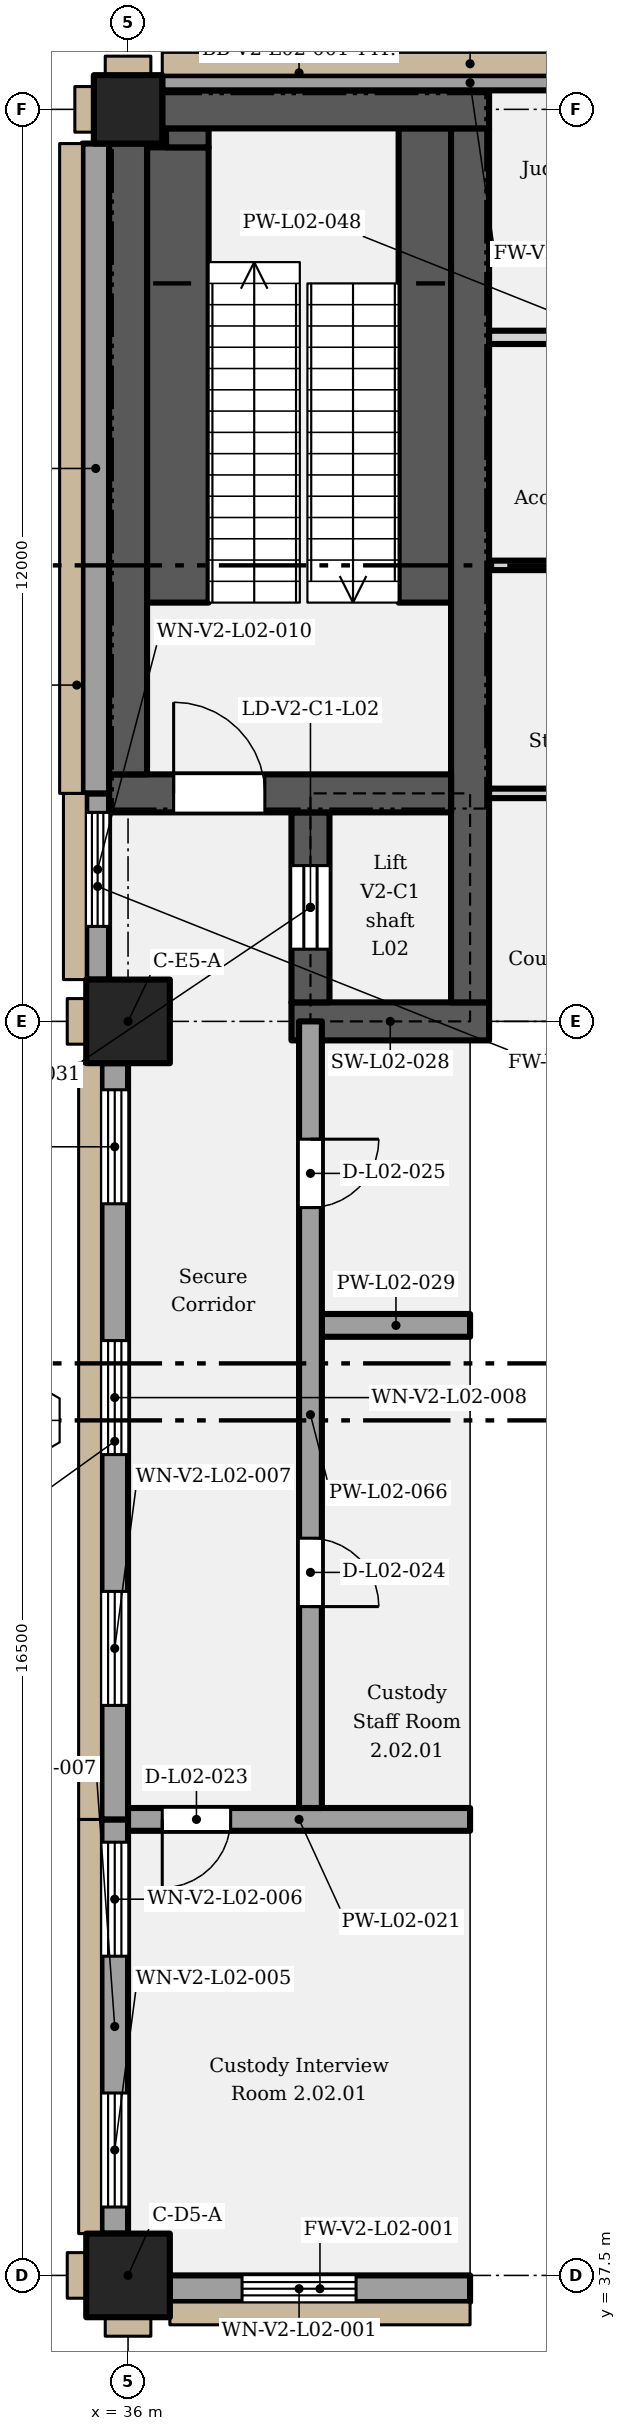
"""IFC4 building model, lengths in metres.
Left out: names, types, materials, properties, quantities, classifications, styles, units other than length and angle.
Written with IfcOpenShell. Run it as: python <this file> out.ifc"""

import sys

from ifc_helpers import new_model, si_unit, direction, frame, frame_2d, origin, origin_2d, place, context, subcontext, project, spatial, rectangle, extrude, element, fill, save


model = new_model("IFC4")
c1 = context("Model", 3, precision=1e-05, world=origin(), true_north=direction((0.0, 1.0)))
c2 = subcontext(c1, "Body", "Model", "MODEL_VIEW")
j1 = project(units=[si_unit("LENGTHUNIT", "METRE"), si_unit("PLANEANGLEUNIT", "RADIAN")], contexts=[c1])
p1 = place(None, origin())
s1 = spatial("IfcSite", under=j1, at=p1, CompositionType="ELEMENT")
p2 = place(p1, origin())
s2 = spatial("IfcBuilding", under=s1, at=p2, CompositionType="ELEMENT")
p3 = place(p2, frame((0.0, 0.0, 12.0)))
s3 = spatial("IfcBuildingStorey", under=s2, at=p3, CompositionType="ELEMENT", Elevation=12.0)
for number, where, z_axis, x_axis in (
    (1, (36.0, 37.5, 0.0), (0.0, 0.0, 1.0), (1.0, 0.0, 0.0)),
    (2, (36.0, 54.0, 0.0), (0.0, 0.0, 1.0), (1.0, 0.0, 0.0)),
):
    element("IfcColumn", number, at=place(p3, frame(where, z_axis=z_axis, x_axis=x_axis)), inside=s3, PredefinedType="COLUMN", context=c2, shape_type="SweptSolid", body=[
        extrude(rectangle(XDim=1.1, YDim=1.1, at=origin_2d()), origin(), (0.0, 0.0, 1.0), 5.4),
    ])
p4 = place(p3, frame((36.0, 66.0, 0.0), z_axis=(0.0, 0.0, 1.0), x_axis=(1.0, 0.0, 0.0)))
e3 = element("IfcColumn", 3, at=p4, inside=s3, PredefinedType="COLUMN", context=c2, shape_type="SweptSolid", body=[
    extrude(rectangle(XDim=0.9, YDim=0.9, at=origin_2d()), origin(), (0.0, 0.0, 1.0), 5.4),
])
p5 = place(p3, frame((38.15, 54.0, 0.0), z_axis=(0.0, 0.0, 1.0), x_axis=(1.0, 0.0, 0.0)))
e4 = element("IfcWall", 4, at=p5, inside=s3, PredefinedType="SHEAR", context=c2, shape_type="SweptSolid", body=[
    extrude(rectangle(XDim=2.6, YDim=0.5, at=frame_2d((1.3, 0.0))), origin(), (0.0, 0.0, 1.0), 5.15),
])
p6 = place(p3, frame((38.4, 54.25, 0.0), z_axis=(0.0, 0.0, 1.0), x_axis=(0.0, 1.0, 0.0)))
e5 = element("IfcWall", 5, at=p6, inside=s3, PredefinedType="SHEAR", context=c2, shape_type="SweptSolid", body=[
    extrude(rectangle(XDim=2.5, YDim=0.5, at=frame_2d((1.25, 0.0))), origin(), (0.0, 0.0, 1.0), 5.15),
])
p7 = place(p6, frame((0.7, 0.0, 0.0)))
e6 = element("IfcOpeningElement", 6, at=p7, cuts=e5, PredefinedType="OPENING", context=c2, shape_type="SweptSolid", body=[
    extrude(rectangle(XDim=1.1, YDim=2.1, at=frame_2d((0.55, 1.05))), frame((0.0, 0.26, 0.0), z_axis=(0.0, -1.0, 0.0), x_axis=(1.0, 0.0, 0.0)), (0.0, 0.0, 1.0), 0.52),
])
p8 = place(p3, frame((40.5, 54.25, 0.0), z_axis=(0.0, 0.0, 1.0), x_axis=(0.0, 1.0, 0.0)))
e7 = element("IfcWall", 7, at=p8, inside=s3, PredefinedType="SHEAR", context=c2, shape_type="SweptSolid", body=[
    extrude(rectangle(XDim=11.5, YDim=0.5, at=frame_2d((5.75, 0.0))), origin(), (0.0, 0.0, 1.0), 5.15),
])
p9 = place(p3, frame((35.75, 57.0, 0.0), z_axis=(0.0, 0.0, 1.0), x_axis=(1.0, 0.0, 0.0)))
e8 = element("IfcWall", 8, at=p9, inside=s3, PredefinedType="SHEAR", context=c2, shape_type="SweptSolid", body=[
    extrude(rectangle(XDim=4.5, YDim=0.5, at=frame_2d((2.25, 0.0))), origin(), (0.0, 0.0, 1.0), 5.15),
])
p10 = place(p9, frame((0.85, 0.0, 0.0)))
e9 = element("IfcOpeningElement", 9, at=p10, cuts=e8, PredefinedType="OPENING", context=c2, shape_type="SweptSolid", body=[
    extrude(rectangle(XDim=1.2, YDim=2.1, at=frame_2d((0.6, 1.05))), frame((0.0, 0.26, 0.0), z_axis=(0.0, -1.0, 0.0), x_axis=(1.0, 0.0, 0.0)), (0.0, 0.0, 1.0), 0.52),
])
p11 = place(p3, frame((36.0, 57.25, 0.0), z_axis=(0.0, 0.0, 1.0), x_axis=(0.0, 1.0, 0.0)))
e10 = element("IfcWall", 10, at=p11, inside=s3, PredefinedType="SHEAR", context=c2, shape_type="SweptSolid", body=[
    extrude(rectangle(XDim=8.3, YDim=0.5, at=frame_2d((4.15, 0.0))), origin(), (0.0, 0.0, 1.0), 5.15),
])
p12 = place(p3, frame((36.45, 66.0, 0.0), z_axis=(0.0, 0.0, 1.0), x_axis=(1.0, 0.0, 0.0)))
e11 = element("IfcWall", 11, at=p12, inside=s3, PredefinedType="SHEAR", context=c2, shape_type="SweptSolid", body=[
    extrude(rectangle(XDim=4.3, YDim=0.5, at=frame_2d((2.15, 0.0))), origin(), (0.0, 0.0, 1.0), 5.15),
])
p13 = place(p3, frame((36.55, 37.325, 0.0), z_axis=(0.0, 0.0, 1.0), x_axis=(1.0, 0.0, 0.0)))
e12 = element("IfcWall", 12, at=p13, inside=s3, PredefinedType="SOLIDWALL", context=c2, shape_type="SweptSolid", body=[
    extrude(rectangle(XDim=3.95, YDim=0.35, at=frame_2d((1.975, 0.0))), origin(), (0.0, 0.0, 1.0), 5.15),
])
p14 = place(p13, frame((0.95, 0.0, 1.05)))
e13 = element("IfcOpeningElement", 13, at=p14, cuts=e12, PredefinedType="OPENING", context=c2, shape_type="SweptSolid", body=[
    extrude(rectangle(XDim=1.5, YDim=3.5, at=frame_2d((0.75, 1.75))), frame((0.0, 0.185, 0.0), z_axis=(0.0, -1.0, 0.0), x_axis=(1.0, 0.0, 0.0)), (0.0, 0.0, 1.0), 0.37),
])
p15 = place(p3, frame((36.45, 66.35, 0.0), z_axis=(0.0, 0.0, 1.0), x_axis=(1.0, 0.0, 0.0)))
e14 = element("IfcWall", 14, at=p15, inside=s3, PredefinedType="SOLIDWALL", context=c2, shape_type="SweptSolid", body=[
    extrude(rectangle(XDim=8.1, YDim=0.2, at=frame_2d((4.05, 0.0))), origin(), (0.0, 0.0, 1.0), 5.15),
])
p16 = place(p15, frame((6.525, 0.0, 1.05)))
e15 = element("IfcOpeningElement", 15, at=p16, cuts=e14, PredefinedType="OPENING", context=c2, shape_type="SweptSolid", body=[
    extrude(rectangle(XDim=1.05, YDim=2.4, at=frame_2d((0.525, 1.2))), frame((0.0, 0.11, 0.0), z_axis=(0.0, -1.0, 0.0), x_axis=(1.0, 0.0, 0.0)), (0.0, 0.0, 1.0), 0.22),
])
p17 = place(p3, frame((35.825, 38.05, 0.0), z_axis=(0.0, 0.0, 1.0), x_axis=(0.0, 1.0, 0.0)))
e16 = element("IfcWall", 16, at=p17, inside=s3, PredefinedType="SOLIDWALL", context=c2, shape_type="SweptSolid", body=[
    extrude(rectangle(XDim=5.45, YDim=0.35, at=frame_2d((2.725, 0.0))), origin(), (0.0, 0.0, 1.0), 5.15),
])
p18 = place(p17, frame((0.35, 0.0, 1.05)))
e17 = element("IfcOpeningElement", 17, at=p18, cuts=e16, PredefinedType="OPENING", context=c2, shape_type="SweptSolid", body=[
    extrude(rectangle(XDim=1.5, YDim=3.5, at=frame_2d((0.75, 1.75))), frame((0.0, 0.185, 0.0), z_axis=(0.0, -1.0, 0.0), x_axis=(1.0, 0.0, 0.0)), (0.0, 0.0, 1.0), 0.37),
])
p19 = place(p17, frame((3.65, 0.0, 1.05)))
e18 = element("IfcOpeningElement", 18, at=p19, cuts=e16, PredefinedType="OPENING", context=c2, shape_type="SweptSolid", body=[
    extrude(rectangle(XDim=1.5, YDim=3.5, at=frame_2d((0.75, 1.75))), frame((0.0, 0.185, 0.0), z_axis=(0.0, -1.0, 0.0), x_axis=(1.0, 0.0, 0.0)), (0.0, 0.0, 1.0), 0.37),
])
p20 = place(p3, frame((35.825, 43.5, 0.0), z_axis=(0.0, 0.0, 1.0), x_axis=(0.0, 1.0, 0.0)))
e19 = element("IfcWall", 19, at=p20, inside=s3, PredefinedType="SOLIDWALL", context=c2, shape_type="SweptSolid", body=[
    extrude(rectangle(XDim=9.95, YDim=0.35, at=frame_2d((4.975, 0.0))), origin(), (0.0, 0.0, 1.0), 5.15),
])
p21 = place(p20, frame((1.5, 0.0, 1.05)))
e20 = element("IfcOpeningElement", 20, at=p21, cuts=e19, PredefinedType="OPENING", context=c2, shape_type="SweptSolid", body=[
    extrude(rectangle(XDim=1.5, YDim=3.5, at=frame_2d((0.75, 1.75))), frame((0.0, 0.185, 0.0), z_axis=(0.0, -1.0, 0.0), x_axis=(1.0, 0.0, 0.0)), (0.0, 0.0, 1.0), 0.37),
])
p22 = place(p20, frame((4.8, 0.0, 1.05)))
e21 = element("IfcOpeningElement", 21, at=p22, cuts=e19, PredefinedType="OPENING", context=c2, shape_type="SweptSolid", body=[
    extrude(rectangle(XDim=1.5, YDim=3.5, at=frame_2d((0.75, 1.75))), frame((0.0, 0.185, 0.0), z_axis=(0.0, -1.0, 0.0), x_axis=(1.0, 0.0, 0.0)), (0.0, 0.0, 1.0), 0.37),
])
p23 = place(p20, frame((8.1, 0.0, 1.05)))
e22 = element("IfcOpeningElement", 22, at=p23, cuts=e19, PredefinedType="OPENING", context=c2, shape_type="SweptSolid", body=[
    extrude(rectangle(XDim=1.5, YDim=3.5, at=frame_2d((0.75, 1.75))), frame((0.0, 0.185, 0.0), z_axis=(0.0, -1.0, 0.0), x_axis=(1.0, 0.0, 0.0)), (0.0, 0.0, 1.0), 0.37),
])
p24 = place(p3, frame((35.6, 54.55, 0.0), z_axis=(0.0, 0.0, 1.0), x_axis=(0.0, 1.0, 0.0)))
e23 = element("IfcWall", 23, at=p24, inside=s3, PredefinedType="SOLIDWALL", context=c2, shape_type="SweptSolid", body=[
    extrude(rectangle(XDim=2.45, YDim=0.3, at=frame_2d((1.225, 0.0))), origin(), (0.0, 0.0, 1.0), 5.15),
])
p25 = place(p24, frame((0.7, 0.0, 1.05)))
e24 = element("IfcOpeningElement", 24, at=p25, cuts=e23, PredefinedType="OPENING", context=c2, shape_type="SweptSolid", body=[
    extrude(rectangle(XDim=1.5, YDim=3.5, at=frame_2d((0.75, 1.75))), frame((0.0, 0.16, 0.0), z_axis=(0.0, -1.0, 0.0), x_axis=(1.0, 0.0, 0.0)), (0.0, 0.0, 1.0), 0.32),
])
p26 = place(p3, frame((35.575, 57.0, 0.0), z_axis=(0.0, 0.0, 1.0), x_axis=(0.0, 1.0, 0.0)))
e25 = element("IfcWall", 25, at=p26, inside=s3, PredefinedType="SOLIDWALL", context=c2, shape_type="SweptSolid", body=[
    extrude(rectangle(XDim=8.55, YDim=0.35, at=frame_2d((4.275, 0.0))), origin(), (0.0, 0.0, 1.0), 5.15),
])
p27 = place(p3, frame((36.0, 43.5, 0.0), z_axis=(0.0, 0.0, 1.0), x_axis=(1.0, 0.0, 0.0)))
e26 = element("IfcWall", 26, at=p27, inside=s3, PredefinedType="PARTITIONING", context=c2, shape_type="SweptSolid", body=[
    extrude(rectangle(XDim=4.5, YDim=0.3, at=frame_2d((2.25, 0.0))), origin(), (0.0, 0.0, 1.0), 5.15),
])
p28 = place(p27, frame((1.35, 0.0, 0.0), z_axis=(0.0, 0.0, 1.0), x_axis=(-1.0, 0.0, 0.0)))
e27 = element("IfcOpeningElement", 27, at=p28, cuts=e26, PredefinedType="OPENING", context=c2, shape_type="SweptSolid", body=[
    extrude(rectangle(XDim=0.9, YDim=2.1, at=frame_2d((0.45, 1.05))), frame((0.0, 0.16, 0.0), z_axis=(0.0, -1.0, 0.0), x_axis=(1.0, 0.0, 0.0)), (0.0, 0.0, 1.0), 0.32),
])
p29 = place(p3, frame((38.55, 50.0, 0.0), z_axis=(0.0, 0.0, 1.0), x_axis=(1.0, 0.0, 0.0)))
e28 = element("IfcWall", 28, at=p29, inside=s3, PredefinedType="PARTITIONING", context=c2, shape_type="SweptSolid", body=[
    extrude(rectangle(XDim=1.95, YDim=0.3, at=frame_2d((0.975, 0.0))), origin(), (0.0, 0.0, 1.0), 5.15),
])
for number, where, z_axis, x_axis in (
    (29, (40.75, 57.0, 0.0), (0.0, 0.0, 1.0), (1.0, 0.0, 0.0)),
    (30, (40.75, 60.0, 0.0), (0.0, 0.0, 1.0), (1.0, 0.0, 0.0)),
):
    element("IfcWall", number, at=place(p3, frame(where, z_axis=z_axis, x_axis=x_axis)), inside=s3, PredefinedType="PARTITIONING", context=c2, shape_type="SweptSolid", body=[
        extrude(rectangle(XDim=3.275, YDim=0.125, at=frame_2d((1.637, 0.0))), origin(), (0.0, 0.0, 1.0), 5.15),
    ])
p30 = place(p3, frame((40.75, 63.0, 0.0), z_axis=(0.0, 0.0, 1.0), x_axis=(1.0, 0.0, 0.0)))
e31 = element("IfcWall", 31, at=p30, inside=s3, PredefinedType="PARTITIONING", context=c2, shape_type="SweptSolid", body=[
    extrude(rectangle(XDim=3.35, YDim=0.175, at=frame_2d((1.675, 0.0))), origin(), (0.0, 0.0, 1.0), 5.15),
])
p31 = place(p3, frame((38.4, 43.65, 0.0), z_axis=(0.0, 0.0, 1.0), x_axis=(0.0, 1.0, 0.0)))
e32 = element("IfcWall", 32, at=p31, inside=s3, PredefinedType="PARTITIONING", context=c2, shape_type="SweptSolid", body=[
    extrude(rectangle(XDim=10.35, YDim=0.3, at=frame_2d((5.175, 0.0))), origin(), (0.0, 0.0, 1.0), 5.15),
])
p32 = place(p31, frame((3.55, 0.0, 0.0), z_axis=(0.0, 0.0, 1.0), x_axis=(-1.0, 0.0, 0.0)))
e33 = element("IfcOpeningElement", 33, at=p32, cuts=e32, PredefinedType="OPENING", context=c2, shape_type="SweptSolid", body=[
    extrude(rectangle(XDim=0.9, YDim=2.1, at=frame_2d((0.45, 1.05))), frame((0.0, 0.16, 0.0), z_axis=(0.0, -1.0, 0.0), x_axis=(1.0, 0.0, 0.0)), (0.0, 0.0, 1.0), 0.32),
])
p33 = place(p31, frame((8.8, 0.0, 0.0), z_axis=(0.0, 0.0, 1.0), x_axis=(-1.0, 0.0, 0.0)))
e34 = element("IfcOpeningElement", 34, at=p33, cuts=e32, PredefinedType="OPENING", context=c2, shape_type="SweptSolid", body=[
    extrude(rectangle(XDim=0.9, YDim=2.1, at=frame_2d((0.45, 1.05))), frame((0.0, 0.16, 0.0), z_axis=(0.0, -1.0, 0.0), x_axis=(1.0, 0.0, 0.0)), (0.0, 0.0, 1.0), 0.32),
])
p34 = place(p3, frame((36.655, 59.51, 0.0), z_axis=(0.0, 0.0, 1.0), x_axis=(0.0, 1.0, 0.0)))
e35 = element("IfcWall", 35, at=p34, inside=s3, PredefinedType="SHEAR", context=c2, shape_type="SweptSolid", body=[
    extrude(rectangle(XDim=5.99, YDim=0.81, at=frame_2d((2.995, 0.0))), origin(), (0.0, 0.0, 1.0), 2.587),
])
p35 = place(p3, frame((36.78, 65.5, 0.0), z_axis=(0.0, 0.0, 1.0), x_axis=(0.0, 1.0, 0.0)))
e36 = element("IfcWall", 36, at=p35, inside=s3, PredefinedType="SHEAR", context=c2, shape_type="SweptSolid", body=[
    extrude(rectangle(XDim=0.25, YDim=0.56, at=frame_2d((0.125, 0.0))), origin(), (0.0, 0.0, 1.0), 2.587),
])
p36 = place(p3, frame((39.905, 59.51, 0.0), z_axis=(0.0, 0.0, 1.0), x_axis=(0.0, 1.0, 0.0)))
e37 = element("IfcWall", 37, at=p36, inside=s3, PredefinedType="SHEAR", context=c2, shape_type="SweptSolid", body=[
    extrude(rectangle(XDim=6.24, YDim=0.69, at=frame_2d((3.12, 0.0))), origin(), (0.0, 0.0, 1.0), 2.587),
])
p37 = place(p14, origin())
e38 = element("IfcWindow", 38, at=p37, inside=s3, PartitioningType="SINGLE_PANEL", PredefinedType="WINDOW", context=c2, shape_type="SweptSolid", body=[
    extrude(rectangle(XDim=1.5, YDim=3.5, at=frame_2d((0.75, 1.75))), frame((0.0, 0.03, 0.0), z_axis=(0.0, -1.0, 0.0), x_axis=(1.0, 0.0, 0.0)), (0.0, 0.0, 1.0), 0.06),
])
fill(e13, e38)
p38 = place(p18, origin())
e39 = element("IfcWindow", 39, at=p38, inside=s3, PartitioningType="SINGLE_PANEL", PredefinedType="WINDOW", context=c2, shape_type="SweptSolid", body=[
    extrude(rectangle(XDim=1.5, YDim=3.5, at=frame_2d((0.75, 1.75))), frame((0.0, 0.03, 0.0), z_axis=(0.0, -1.0, 0.0), x_axis=(1.0, 0.0, 0.0)), (0.0, 0.0, 1.0), 0.06),
])
fill(e17, e39)
p39 = place(p19, origin())
e40 = element("IfcWindow", 40, at=p39, inside=s3, PartitioningType="SINGLE_PANEL", PredefinedType="WINDOW", context=c2, shape_type="SweptSolid", body=[
    extrude(rectangle(XDim=1.5, YDim=3.5, at=frame_2d((0.75, 1.75))), frame((0.0, 0.03, 0.0), z_axis=(0.0, -1.0, 0.0), x_axis=(1.0, 0.0, 0.0)), (0.0, 0.0, 1.0), 0.06),
])
fill(e18, e40)
p40 = place(p21, origin())
e41 = element("IfcWindow", 41, at=p40, inside=s3, PartitioningType="SINGLE_PANEL", PredefinedType="WINDOW", context=c2, shape_type="SweptSolid", body=[
    extrude(rectangle(XDim=1.5, YDim=3.5, at=frame_2d((0.75, 1.75))), frame((0.0, 0.03, 0.0), z_axis=(0.0, -1.0, 0.0), x_axis=(1.0, 0.0, 0.0)), (0.0, 0.0, 1.0), 0.06),
])
fill(e20, e41)
p41 = place(p22, origin())
e42 = element("IfcWindow", 42, at=p41, inside=s3, PartitioningType="SINGLE_PANEL", PredefinedType="WINDOW", context=c2, shape_type="SweptSolid", body=[
    extrude(rectangle(XDim=1.5, YDim=3.5, at=frame_2d((0.75, 1.75))), frame((0.0, 0.03, 0.0), z_axis=(0.0, -1.0, 0.0), x_axis=(1.0, 0.0, 0.0)), (0.0, 0.0, 1.0), 0.06),
])
fill(e21, e42)
p42 = place(p23, origin())
e43 = element("IfcWindow", 43, at=p42, inside=s3, PartitioningType="SINGLE_PANEL", PredefinedType="WINDOW", context=c2, shape_type="SweptSolid", body=[
    extrude(rectangle(XDim=1.5, YDim=3.5, at=frame_2d((0.75, 1.75))), frame((0.0, 0.03, 0.0), z_axis=(0.0, -1.0, 0.0), x_axis=(1.0, 0.0, 0.0)), (0.0, 0.0, 1.0), 0.06),
])
fill(e22, e43)
p43 = place(p25, origin())
e44 = element("IfcWindow", 44, at=p43, inside=s3, PartitioningType="SINGLE_PANEL", PredefinedType="WINDOW", context=c2, shape_type="SweptSolid", body=[
    extrude(rectangle(XDim=1.5, YDim=3.5, at=frame_2d((0.75, 1.75))), frame((0.0, 0.03, 0.0), z_axis=(0.0, -1.0, 0.0), x_axis=(1.0, 0.0, 0.0)), (0.0, 0.0, 1.0), 0.06),
])
fill(e24, e44)
p44 = place(p7, origin())
e45 = element("IfcDoor", 45, at=p44, inside=s3, OperationType="SLIDING_TO_LEFT", PredefinedType="DOOR", context=c2, shape_type="SweptSolid", body=[
    extrude(rectangle(XDim=1.1, YDim=2.1, at=frame_2d((0.55, 1.05))), frame((0.0, 0.025, 0.0), z_axis=(0.0, -1.0, 0.0), x_axis=(1.0, 0.0, 0.0)), (0.0, 0.0, 1.0), 0.05),
])
fill(e6, e45)
p45 = place(p10, origin())
e46 = element("IfcDoor", 46, at=p45, inside=s3, OperationType="SINGLE_SWING_LEFT", PredefinedType="DOOR", context=c2, shape_type="SweptSolid", body=[
    extrude(rectangle(XDim=1.2, YDim=2.1, at=frame_2d((0.6, 1.05))), frame((0.0, 0.025, 0.0), z_axis=(0.0, -1.0, 0.0), x_axis=(1.0, 0.0, 0.0)), (0.0, 0.0, 1.0), 0.05),
])
fill(e9, e46)
p46 = place(p28, origin())
e47 = element("IfcDoor", 47, at=p46, inside=s3, OperationType="SINGLE_SWING_RIGHT", PredefinedType="DOOR", context=c2, shape_type="SweptSolid", body=[
    extrude(rectangle(XDim=0.9, YDim=2.1, at=frame_2d((0.45, 1.05))), frame((0.0, 0.025, 0.0), z_axis=(0.0, -1.0, 0.0), x_axis=(1.0, 0.0, 0.0)), (0.0, 0.0, 1.0), 0.05),
])
fill(e27, e47)
p47 = place(p32, origin())
e48 = element("IfcDoor", 48, at=p47, inside=s3, OperationType="SINGLE_SWING_RIGHT", PredefinedType="DOOR", context=c2, shape_type="SweptSolid", body=[
    extrude(rectangle(XDim=0.9, YDim=2.1, at=frame_2d((0.45, 1.05))), frame((0.0, 0.025, 0.0), z_axis=(0.0, -1.0, 0.0), x_axis=(1.0, 0.0, 0.0)), (0.0, 0.0, 1.0), 0.05),
])
fill(e33, e48)
p48 = place(p33, origin())
e49 = element("IfcDoor", 49, at=p48, inside=s3, OperationType="SINGLE_SWING_LEFT", PredefinedType="DOOR", context=c2, shape_type="SweptSolid", body=[
    extrude(rectangle(XDim=0.9, YDim=2.1, at=frame_2d((0.45, 1.05))), frame((0.0, 0.025, 0.0), z_axis=(0.0, -1.0, 0.0), x_axis=(1.0, 0.0, 0.0)), (0.0, 0.0, 1.0), 0.05),
])
fill(e34, e49)
save(model, sys.argv[1])
